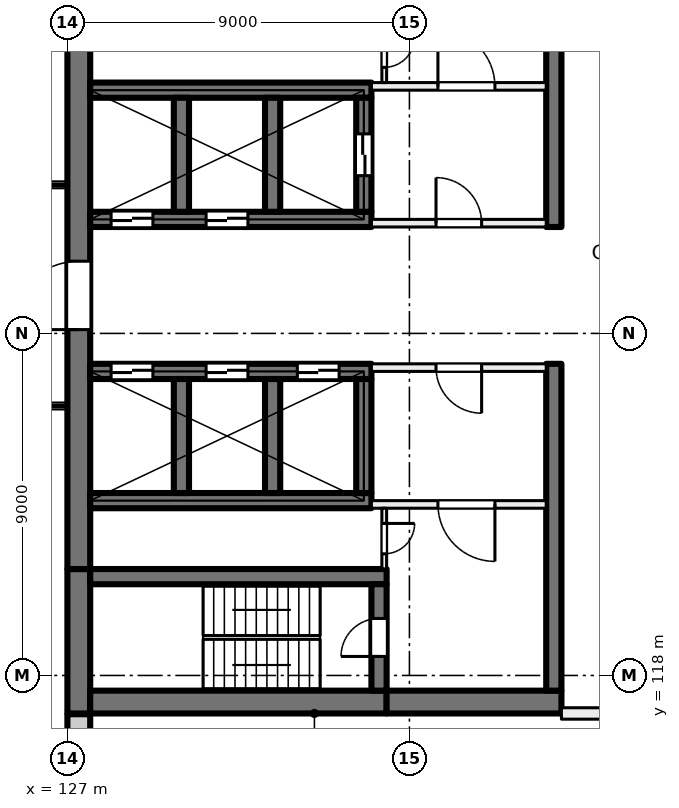
"""IFC4 building model, lengths in metres.
Left out: names, types, materials, properties, quantities, classifications, styles, units other than length and angle.
Written with IfcOpenShell. Run it as: python <this file> out.ifc"""

import sys

from ifc_helpers import new_model, si_unit, direction, frame, frame_2d, origin, place, context, subcontext, project, spatial, rectangle, extrude, element, fill, save


model = new_model("IFC4")
c1 = context("Model", 3, precision=1e-05, world=origin(), true_north=direction((0.0, 1.0)))
c2 = subcontext(c1, "Body", "Model", "MODEL_VIEW")
j1 = project(units=[si_unit("LENGTHUNIT", "METRE"), si_unit("PLANEANGLEUNIT", "RADIAN")], contexts=[c1])
p1 = place(None, origin())
s1 = spatial("IfcSite", under=j1, at=p1, CompositionType="ELEMENT")
p2 = place(p1, origin())
s2 = spatial("IfcBuilding", under=s1, at=p2, CompositionType="ELEMENT")
p3 = place(p2, frame((0.0, 0.0, 109.0)))
s3 = spatial("IfcBuildingStorey", under=s2, at=p3, CompositionType="ELEMENT", Elevation=109.0)
p4 = place(p3, frame((127.3, 117.0, 0.0), z_axis=(0.0, 0.0, 1.0), x_axis=(0.0, 1.0, 0.0)))
e1 = element("IfcWall", 1, at=p4, inside=s3, PredefinedType="SHEAR", context=c2, shape_type="SweptSolid", body=[
    extrude(rectangle(XDim=3.8, YDim=0.6, at=frame_2d((1.9, 0.0))), origin(), (0.0, 0.0, 1.0), 4.0),
])
p5 = place(p3, frame((127.3, 120.8, 0.0), z_axis=(0.0, 0.0, 1.0), x_axis=(0.0, 1.0, 0.0)))
e2 = element("IfcWall", 2, at=p5, inside=s3, PredefinedType="SHEAR", context=c2, shape_type="SweptSolid", body=[
    extrude(rectangle(XDim=14.4, YDim=0.6, at=frame_2d((7.2, 0.0))), origin(), (0.0, 0.0, 1.0), 4.0),
])
p6 = place(p5, frame((6.3, 0.0, 0.0)))
e3 = element("IfcOpeningElement", 3, at=p6, cuts=e2, PredefinedType="OPENING", context=c2, shape_type="SweptSolid", body=[
    extrude(rectangle(XDim=1.8, YDim=2.1, at=frame_2d((0.9, 1.05))), frame((0.0, 0.31, 0.0), z_axis=(0.0, -1.0, 0.0), x_axis=(1.0, 0.0, 0.0)), (0.0, 0.0, 1.0), 0.62),
])
p7 = place(p3, frame((127.6, 117.3, 0.0), z_axis=(0.0, 0.0, 1.0), x_axis=(1.0, 0.0, 0.0)))
e4 = element("IfcWall", 4, at=p7, inside=s3, PredefinedType="SHEAR", context=c2, shape_type="SweptSolid", body=[
    extrude(rectangle(XDim=7.8, YDim=0.6, at=frame_2d((3.9, 0.0))), origin(), (0.0, 0.0, 1.0), 4.0),
])
p8 = place(p3, frame((135.4, 117.3, 0.0), z_axis=(0.0, 0.0, 1.0), x_axis=(1.0, 0.0, 0.0)))
e5 = element("IfcWall", 5, at=p8, inside=s3, PredefinedType="SHEAR", context=c2, shape_type="SweptSolid", body=[
    extrude(rectangle(XDim=4.6, YDim=0.6, at=frame_2d((2.3, 0.0))), origin(), (0.0, 0.0, 1.0), 4.0),
])
p9 = place(p3, frame((127.6, 120.6, 0.0), z_axis=(0.0, 0.0, 1.0), x_axis=(1.0, 0.0, 0.0)))
e6 = element("IfcWall", 6, at=p9, inside=s3, PredefinedType="SHEAR", context=c2, shape_type="SweptSolid", body=[
    extrude(rectangle(XDim=7.8, YDim=0.4, at=frame_2d((3.9, 0.0))), origin(), (0.0, 0.0, 1.0), 4.0),
])
p10 = place(p3, frame((135.2, 117.6, 0.0), z_axis=(0.0, 0.0, 1.0), x_axis=(0.0, 1.0, 0.0)))
e7 = element("IfcWall", 7, at=p10, inside=s3, PredefinedType="SHEAR", context=c2, shape_type="SweptSolid", body=[
    extrude(rectangle(XDim=2.8, YDim=0.4, at=frame_2d((1.4, 0.0))), origin(), (0.0, 0.0, 1.0), 4.0),
])
p11 = place(p10, frame((0.9, 0.0, 0.0)))
e8 = element("IfcOpeningElement", 8, at=p11, cuts=e7, PredefinedType="OPENING", context=c2, shape_type="SweptSolid", body=[
    extrude(rectangle(XDim=1.0, YDim=2.1, at=frame_2d((0.5, 1.05))), frame((0.0, 0.21, 0.0), z_axis=(0.0, -1.0, 0.0), x_axis=(1.0, 0.0, 0.0)), (0.0, 0.0, 1.0), 0.42),
])
p12 = place(p3, frame((127.6, 126.0, 0.0), z_axis=(0.0, 0.0, 1.0), x_axis=(1.0, 0.0, 0.0)))
e9 = element("IfcWall", 9, at=p12, inside=s3, PredefinedType="SHEAR", context=c2, shape_type="SweptSolid", body=[
    extrude(rectangle(XDim=7.4, YDim=0.4, at=frame_2d((3.7, 0.0))), origin(), (0.0, 0.0, 1.0), 4.0),
])
p13 = place(p12, frame((0.55, 0.0, 0.0)))
e10 = element("IfcOpeningElement", 10, at=p13, cuts=e9, PredefinedType="OPENING", context=c2, shape_type="SweptSolid", body=[
    extrude(rectangle(XDim=1.1, YDim=2.1, at=frame_2d((0.55, 1.05))), frame((0.0, 0.21, 0.0), z_axis=(0.0, -1.0, 0.0), x_axis=(1.0, 0.0, 0.0)), (0.0, 0.0, 1.0), 0.42),
])
p14 = place(p12, frame((3.05, 0.0, 0.0)))
e11 = element("IfcOpeningElement", 11, at=p14, cuts=e9, PredefinedType="OPENING", context=c2, shape_type="SweptSolid", body=[
    extrude(rectangle(XDim=1.1, YDim=2.1, at=frame_2d((0.55, 1.05))), frame((0.0, 0.21, 0.0), z_axis=(0.0, -1.0, 0.0), x_axis=(1.0, 0.0, 0.0)), (0.0, 0.0, 1.0), 0.42),
])
p15 = place(p12, frame((5.45, 0.0, 0.0)))
e12 = element("IfcOpeningElement", 12, at=p15, cuts=e9, PredefinedType="OPENING", context=c2, shape_type="SweptSolid", body=[
    extrude(rectangle(XDim=1.1, YDim=2.1, at=frame_2d((0.55, 1.05))), frame((0.0, 0.21, 0.0), z_axis=(0.0, -1.0, 0.0), x_axis=(1.0, 0.0, 0.0)), (0.0, 0.0, 1.0), 0.42),
])
p16 = place(p3, frame((127.6, 122.6, 0.0), z_axis=(0.0, 0.0, 1.0), x_axis=(1.0, 0.0, 0.0)))
e13 = element("IfcWall", 13, at=p16, inside=s3, PredefinedType="SHEAR", context=c2, shape_type="SweptSolid", body=[
    extrude(rectangle(XDim=7.4, YDim=0.4, at=frame_2d((3.7, 0.0))), origin(), (0.0, 0.0, 1.0), 4.0),
])
for number, where, z_axis, x_axis in (
    (14, (130.0, 122.8, 0.0), (0.0, 0.0, 1.0), (0.0, 1.0, 0.0)),
    (15, (132.4, 122.8, 0.0), (0.0, 0.0, 1.0), (0.0, 1.0, 0.0)),
    (16, (134.8, 122.8, 0.0), (0.0, 0.0, 1.0), (0.0, 1.0, 0.0)),
):
    element("IfcWall", number, at=place(p3, frame(where, z_axis=z_axis, x_axis=x_axis)), inside=s3, PredefinedType="SHEAR", context=c2, shape_type="SweptSolid", body=[
        extrude(rectangle(XDim=3.0, YDim=0.4, at=frame_2d((1.5, 0.0))), origin(), (0.0, 0.0, 1.0), 4.0),
    ])
p17 = place(p3, frame((127.6, 130.0, 0.0), z_axis=(0.0, 0.0, 1.0), x_axis=(1.0, 0.0, 0.0)))
e17 = element("IfcWall", 17, at=p17, inside=s3, PredefinedType="SHEAR", context=c2, shape_type="SweptSolid", body=[
    extrude(rectangle(XDim=7.4, YDim=0.4, at=frame_2d((3.7, 0.0))), origin(), (0.0, 0.0, 1.0), 4.0),
])
p18 = place(p17, frame((0.55, 0.0, 0.0)))
e18 = element("IfcOpeningElement", 18, at=p18, cuts=e17, PredefinedType="OPENING", context=c2, shape_type="SweptSolid", body=[
    extrude(rectangle(XDim=1.1, YDim=2.1, at=frame_2d((0.55, 1.05))), frame((0.0, 0.21, 0.0), z_axis=(0.0, -1.0, 0.0), x_axis=(1.0, 0.0, 0.0)), (0.0, 0.0, 1.0), 0.42),
])
p19 = place(p17, frame((3.05, 0.0, 0.0)))
e19 = element("IfcOpeningElement", 19, at=p19, cuts=e17, PredefinedType="OPENING", context=c2, shape_type="SweptSolid", body=[
    extrude(rectangle(XDim=1.1, YDim=2.1, at=frame_2d((0.55, 1.05))), frame((0.0, 0.21, 0.0), z_axis=(0.0, -1.0, 0.0), x_axis=(1.0, 0.0, 0.0)), (0.0, 0.0, 1.0), 0.42),
])
p20 = place(p3, frame((127.6, 133.4, 0.0), z_axis=(0.0, 0.0, 1.0), x_axis=(1.0, 0.0, 0.0)))
e20 = element("IfcWall", 20, at=p20, inside=s3, PredefinedType="SHEAR", context=c2, shape_type="SweptSolid", body=[
    extrude(rectangle(XDim=7.4, YDim=0.4, at=frame_2d((3.7, 0.0))), origin(), (0.0, 0.0, 1.0), 4.0),
])
for number, where, z_axis, x_axis in (
    (21, (130.0, 130.2, 0.0), (0.0, 0.0, 1.0), (0.0, 1.0, 0.0)),
    (22, (132.4, 130.2, 0.0), (0.0, 0.0, 1.0), (0.0, 1.0, 0.0)),
):
    element("IfcWall", number, at=place(p3, frame(where, z_axis=z_axis, x_axis=x_axis)), inside=s3, PredefinedType="SHEAR", context=c2, shape_type="SweptSolid", body=[
        extrude(rectangle(XDim=3.0, YDim=0.4, at=frame_2d((1.5, 0.0))), origin(), (0.0, 0.0, 1.0), 4.0),
    ])
p21 = place(p3, frame((134.8, 130.2, 0.0), z_axis=(0.0, 0.0, 1.0), x_axis=(0.0, 1.0, 0.0)))
e23 = element("IfcWall", 23, at=p21, inside=s3, PredefinedType="SHEAR", context=c2, shape_type="SweptSolid", body=[
    extrude(rectangle(XDim=3.0, YDim=0.4, at=frame_2d((1.5, 0.0))), origin(), (0.0, 0.0, 1.0), 4.0),
])
p22 = place(p21, frame((0.95, 0.0, 0.0)))
e24 = element("IfcOpeningElement", 24, at=p22, cuts=e23, PredefinedType="OPENING", context=c2, shape_type="SweptSolid", body=[
    extrude(rectangle(XDim=1.1, YDim=2.1, at=frame_2d((0.55, 1.05))), frame((0.0, 0.21, 0.0), z_axis=(0.0, -1.0, 0.0), x_axis=(1.0, 0.0, 0.0)), (0.0, 0.0, 1.0), 0.42),
])
for number, where, z_axis, x_axis in (
    (25, (139.8, 117.6, 0.0), (0.0, 0.0, 1.0), (0.0, 1.0, 0.0)),
    (26, (139.8, 129.8, 0.0), (0.0, 0.0, 1.0), (0.0, 1.0, 0.0)),
):
    element("IfcWall", number, at=place(p3, frame(where, z_axis=z_axis, x_axis=x_axis)), inside=s3, PredefinedType="SHEAR", context=c2, shape_type="SweptSolid", body=[
        extrude(rectangle(XDim=8.6, YDim=0.4, at=frame_2d((4.3, 0.0))), origin(), (0.0, 0.0, 1.0), 4.0),
    ])
p23 = place(p3, frame((127.3, 114.07, 0.0), z_axis=(0.0, 0.0, 1.0), x_axis=(0.0, 1.0, 0.0)))
e27 = element("IfcWall", 27, at=p23, inside=s3, PredefinedType="SOLIDWALL", context=c2, shape_type="SweptSolid", body=[
    extrude(rectangle(XDim=2.91, YDim=0.6, at=frame_2d((1.455, 0.0))), origin(), (0.0, 0.0, 1.0), 3.625),
])
p24 = place(p3, frame((135.0, 129.9, 0.0), z_axis=(0.0, 0.0, 1.0), x_axis=(1.0, 0.0, 0.0)))
e28 = element("IfcWall", 28, at=p24, inside=s3, PredefinedType="PARTITIONING", context=c2, shape_type="SweptSolid", body=[
    extrude(rectangle(XDim=4.6, YDim=0.2, at=frame_2d((2.3, 0.0))), origin(), (0.0, 0.0, 1.0), 3.625),
])
p25 = place(p24, frame((1.7, 0.0, 0.0)))
e29 = element("IfcOpeningElement", 29, at=p25, cuts=e28, PredefinedType="OPENING", context=c2, shape_type="SweptSolid", body=[
    extrude(rectangle(XDim=1.2, YDim=2.1, at=frame_2d((0.6, 1.05))), frame((0.0, 0.11, 0.0), z_axis=(0.0, -1.0, 0.0), x_axis=(1.0, 0.0, 0.0)), (0.0, 0.0, 1.0), 0.22),
])
p26 = place(p3, frame((135.0, 133.5, 0.0), z_axis=(0.0, 0.0, 1.0), x_axis=(1.0, 0.0, 0.0)))
e30 = element("IfcWall", 30, at=p26, inside=s3, PredefinedType="PARTITIONING", context=c2, shape_type="SweptSolid", body=[
    extrude(rectangle(XDim=4.6, YDim=0.2, at=frame_2d((2.3, 0.0))), origin(), (0.0, 0.0, 1.0), 3.625),
])
p27 = place(p26, frame((1.75, 0.0, 0.0)))
e31 = element("IfcOpeningElement", 31, at=p27, cuts=e30, PredefinedType="OPENING", context=c2, shape_type="SweptSolid", body=[
    extrude(rectangle(XDim=1.5, YDim=2.1, at=frame_2d((0.75, 1.05))), frame((0.0, 0.11, 0.0), z_axis=(0.0, -1.0, 0.0), x_axis=(1.0, 0.0, 0.0)), (0.0, 0.0, 1.0), 0.22),
])
p28 = place(p3, frame((135.337, 135.2, 0.0), z_axis=(0.0, 0.0, 1.0), x_axis=(0.0, -1.0, 0.0)))
e32 = element("IfcWall", 32, at=p28, inside=s3, PredefinedType="PARTITIONING", context=c2, shape_type="SweptSolid", body=[
    extrude(rectangle(XDim=1.6, YDim=0.125, at=frame_2d((0.8, 0.0))), origin(), (0.0, 0.0, 1.0), 3.625),
])
p29 = place(p28, frame((0.4, 0.0, 0.0)))
e33 = element("IfcOpeningElement", 33, at=p29, cuts=e32, PredefinedType="OPENING", context=c2, shape_type="SweptSolid", body=[
    extrude(rectangle(XDim=0.8, YDim=2.1, at=frame_2d((0.4, 1.05))), frame((0.0, 0.073, 0.0), z_axis=(0.0, -1.0, 0.0), x_axis=(1.0, 0.0, 0.0)), (0.0, 0.0, 1.0), 0.145),
])
p30 = place(p3, frame((139.6, 126.1, 0.0), z_axis=(0.0, 0.0, 1.0), x_axis=(-1.0, 0.0, 0.0)))
e34 = element("IfcWall", 34, at=p30, inside=s3, PredefinedType="PARTITIONING", context=c2, shape_type="SweptSolid", body=[
    extrude(rectangle(XDim=4.6, YDim=0.2, at=frame_2d((2.3, 0.0))), origin(), (0.0, 0.0, 1.0), 3.625),
])
p31 = place(p30, frame((1.7, 0.0, 0.0)))
e35 = element("IfcOpeningElement", 35, at=p31, cuts=e34, PredefinedType="OPENING", context=c2, shape_type="SweptSolid", body=[
    extrude(rectangle(XDim=1.2, YDim=2.1, at=frame_2d((0.6, 1.05))), frame((0.0, 0.11, 0.0), z_axis=(0.0, -1.0, 0.0), x_axis=(1.0, 0.0, 0.0)), (0.0, 0.0, 1.0), 0.22),
])
p32 = place(p3, frame((139.6, 122.5, 0.0), z_axis=(0.0, 0.0, 1.0), x_axis=(-1.0, 0.0, 0.0)))
e36 = element("IfcWall", 36, at=p32, inside=s3, PredefinedType="PARTITIONING", context=c2, shape_type="SweptSolid", body=[
    extrude(rectangle(XDim=4.6, YDim=0.2, at=frame_2d((2.3, 0.0))), origin(), (0.0, 0.0, 1.0), 3.625),
])
p33 = place(p32, frame((1.35, 0.0, 0.0)))
e37 = element("IfcOpeningElement", 37, at=p33, cuts=e36, PredefinedType="OPENING", context=c2, shape_type="SweptSolid", body=[
    extrude(rectangle(XDim=1.5, YDim=2.1, at=frame_2d((0.75, 1.05))), frame((0.0, 0.11, 0.0), z_axis=(0.0, -1.0, 0.0), x_axis=(1.0, 0.0, 0.0)), (0.0, 0.0, 1.0), 0.22),
])
p34 = place(p3, frame((135.337, 122.4, 0.0), z_axis=(0.0, 0.0, 1.0), x_axis=(0.0, -1.0, 0.0)))
e38 = element("IfcWall", 38, at=p34, inside=s3, PredefinedType="PARTITIONING", context=c2, shape_type="SweptSolid", body=[
    extrude(rectangle(XDim=1.6, YDim=0.125, at=frame_2d((0.8, 0.0))), origin(), (0.0, 0.0, 1.0), 3.625),
])
p35 = place(p34, frame((0.4, 0.0, 0.0)))
e39 = element("IfcOpeningElement", 39, at=p35, cuts=e38, PredefinedType="OPENING", context=c2, shape_type="SweptSolid", body=[
    extrude(rectangle(XDim=0.8, YDim=2.1, at=frame_2d((0.4, 1.05))), frame((0.0, 0.073, 0.0), z_axis=(0.0, -1.0, 0.0), x_axis=(1.0, 0.0, 0.0)), (0.0, 0.0, 1.0), 0.145),
])
p36 = place(p3, frame((144.35, 117.0, 0.0), z_axis=(0.0, 0.0, 1.0), x_axis=(-1.0, 0.0, 0.0)))
e40 = element("IfcWall", 40, at=p36, inside=s3, PredefinedType="PARTITIONING", context=c2, shape_type="SweptSolid", body=[
    extrude(rectangle(XDim=4.35, YDim=0.3, at=frame_2d((2.175, 0.0))), origin(), (0.0, 0.0, 1.0), 3.625),
])
p37 = place(p36, frame((1.267, 0.0, 0.0)))
e41 = element("IfcOpeningElement", 41, at=p37, cuts=e40, PredefinedType="OPENING", context=c2, shape_type="SweptSolid", body=[
    extrude(rectangle(XDim=1.8, YDim=2.1, at=frame_2d((0.9, 1.05))), frame((0.0, 0.16, 0.0), z_axis=(0.0, -1.0, 0.0), x_axis=(1.0, 0.0, 0.0)), (0.0, 0.0, 1.0), 0.32),
])
p38 = place(p18, origin())
e42 = element("IfcDoor", 42, at=p38, inside=s3, OperationType="DOUBLE_DOOR_SLIDING", PredefinedType="DOOR", context=c2, shape_type="SweptSolid", body=[
    extrude(rectangle(XDim=1.1, YDim=2.1, at=frame_2d((0.55, 1.05))), frame((0.0, 0.025, 0.0), z_axis=(0.0, -1.0, 0.0), x_axis=(1.0, 0.0, 0.0)), (0.0, 0.0, 1.0), 0.05),
])
fill(e18, e42)
p39 = place(p19, origin())
e43 = element("IfcDoor", 43, at=p39, inside=s3, OperationType="DOUBLE_DOOR_SLIDING", PredefinedType="DOOR", context=c2, shape_type="SweptSolid", body=[
    extrude(rectangle(XDim=1.1, YDim=2.1, at=frame_2d((0.55, 1.05))), frame((0.0, 0.025, 0.0), z_axis=(0.0, -1.0, 0.0), x_axis=(1.0, 0.0, 0.0)), (0.0, 0.0, 1.0), 0.05),
])
fill(e19, e43)
p40 = place(p13, origin())
e44 = element("IfcDoor", 44, at=p40, inside=s3, OperationType="DOUBLE_DOOR_SLIDING", PredefinedType="DOOR", context=c2, shape_type="SweptSolid", body=[
    extrude(rectangle(XDim=1.1, YDim=2.1, at=frame_2d((0.55, 1.05))), frame((0.0, 0.025, 0.0), z_axis=(0.0, -1.0, 0.0), x_axis=(1.0, 0.0, 0.0)), (0.0, 0.0, 1.0), 0.05),
])
fill(e10, e44)
p41 = place(p14, origin())
e45 = element("IfcDoor", 45, at=p41, inside=s3, OperationType="DOUBLE_DOOR_SLIDING", PredefinedType="DOOR", context=c2, shape_type="SweptSolid", body=[
    extrude(rectangle(XDim=1.1, YDim=2.1, at=frame_2d((0.55, 1.05))), frame((0.0, 0.025, 0.0), z_axis=(0.0, -1.0, 0.0), x_axis=(1.0, 0.0, 0.0)), (0.0, 0.0, 1.0), 0.05),
])
fill(e11, e45)
p42 = place(p15, origin())
e46 = element("IfcDoor", 46, at=p42, inside=s3, OperationType="DOUBLE_DOOR_SLIDING", PredefinedType="DOOR", context=c2, shape_type="SweptSolid", body=[
    extrude(rectangle(XDim=1.1, YDim=2.1, at=frame_2d((0.55, 1.05))), frame((0.0, 0.025, 0.0), z_axis=(0.0, -1.0, 0.0), x_axis=(1.0, 0.0, 0.0)), (0.0, 0.0, 1.0), 0.05),
])
fill(e12, e46)
p43 = place(p25, origin())
e47 = element("IfcDoor", 47, at=p43, inside=s3, OperationType="DOUBLE_DOOR_SINGLE_SWING", PredefinedType="DOOR", context=c2, shape_type="SweptSolid", body=[
    extrude(rectangle(XDim=1.2, YDim=2.1, at=frame_2d((0.6, 1.05))), frame((0.0, 0.025, 0.0), z_axis=(0.0, -1.0, 0.0), x_axis=(1.0, 0.0, 0.0)), (0.0, 0.0, 1.0), 0.05),
])
fill(e29, e47)
p44 = place(p27, origin())
e48 = element("IfcDoor", 48, at=p44, inside=s3, OperationType="DOUBLE_DOOR_SINGLE_SWING", PredefinedType="DOOR", context=c2, shape_type="SweptSolid", body=[
    extrude(rectangle(XDim=1.5, YDim=2.1, at=frame_2d((0.75, 1.05))), frame((0.0, 0.025, 0.0), z_axis=(0.0, -1.0, 0.0), x_axis=(1.0, 0.0, 0.0)), (0.0, 0.0, 1.0), 0.05),
])
fill(e31, e48)
p45 = place(p29, origin())
e49 = element("IfcDoor", 49, at=p45, inside=s3, OperationType="SINGLE_SWING_RIGHT", PredefinedType="DOOR", context=c2, shape_type="SweptSolid", body=[
    extrude(rectangle(XDim=0.8, YDim=2.1, at=frame_2d((0.4, 1.05))), frame((0.0, 0.025, 0.0), z_axis=(0.0, -1.0, 0.0), x_axis=(1.0, 0.0, 0.0)), (0.0, 0.0, 1.0), 0.05),
])
fill(e33, e49)
p46 = place(p31, origin())
e50 = element("IfcDoor", 50, at=p46, inside=s3, OperationType="DOUBLE_DOOR_SINGLE_SWING", PredefinedType="DOOR", context=c2, shape_type="SweptSolid", body=[
    extrude(rectangle(XDim=1.2, YDim=2.1, at=frame_2d((0.6, 1.05))), frame((0.0, 0.025, 0.0), z_axis=(0.0, -1.0, 0.0), x_axis=(1.0, 0.0, 0.0)), (0.0, 0.0, 1.0), 0.05),
])
fill(e35, e50)
p47 = place(p33, origin())
e51 = element("IfcDoor", 51, at=p47, inside=s3, OperationType="DOUBLE_DOOR_SINGLE_SWING", PredefinedType="DOOR", context=c2, shape_type="SweptSolid", body=[
    extrude(rectangle(XDim=1.5, YDim=2.1, at=frame_2d((0.75, 1.05))), frame((0.0, 0.025, 0.0), z_axis=(0.0, -1.0, 0.0), x_axis=(1.0, 0.0, 0.0)), (0.0, 0.0, 1.0), 0.05),
])
fill(e37, e51)
p48 = place(p11, origin())
e52 = element("IfcDoor", 52, at=p48, inside=s3, OperationType="SINGLE_SWING_RIGHT", PredefinedType="DOOR", context=c2, shape_type="SweptSolid", body=[
    extrude(rectangle(XDim=1.0, YDim=2.1, at=frame_2d((0.5, 1.05))), frame((0.0, 0.025, 0.0), z_axis=(0.0, -1.0, 0.0), x_axis=(1.0, 0.0, 0.0)), (0.0, 0.0, 1.0), 0.05),
])
fill(e8, e52)
p49 = place(p35, origin())
e53 = element("IfcDoor", 53, at=p49, inside=s3, OperationType="SINGLE_SWING_LEFT", PredefinedType="DOOR", context=c2, shape_type="SweptSolid", body=[
    extrude(rectangle(XDim=0.8, YDim=2.1, at=frame_2d((0.4, 1.05))), frame((0.0, 0.025, 0.0), z_axis=(0.0, -1.0, 0.0), x_axis=(1.0, 0.0, 0.0)), (0.0, 0.0, 1.0), 0.05),
])
fill(e39, e53)
p50 = place(p22, origin())
e54 = element("IfcDoor", 54, at=p50, inside=s3, OperationType="DOUBLE_DOOR_SLIDING", PredefinedType="DOOR", context=c2, shape_type="SweptSolid", body=[
    extrude(rectangle(XDim=1.1, YDim=2.1, at=frame_2d((0.55, 1.05))), frame((0.0, 0.025, 0.0), z_axis=(0.0, -1.0, 0.0), x_axis=(1.0, 0.0, 0.0)), (0.0, 0.0, 1.0), 0.05),
])
fill(e24, e54)
p51 = place(p6, origin())
e55 = element("IfcDoor", 55, at=p51, inside=s3, OperationType="DOUBLE_DOOR_SINGLE_SWING", PredefinedType="DOOR", context=c2, shape_type="SweptSolid", body=[
    extrude(rectangle(XDim=1.8, YDim=2.1, at=frame_2d((0.9, 1.05))), frame((0.0, 0.025, 0.0), z_axis=(0.0, -1.0, 0.0), x_axis=(1.0, 0.0, 0.0)), (0.0, 0.0, 1.0), 0.05),
])
fill(e3, e55)
save(model, sys.argv[1])
